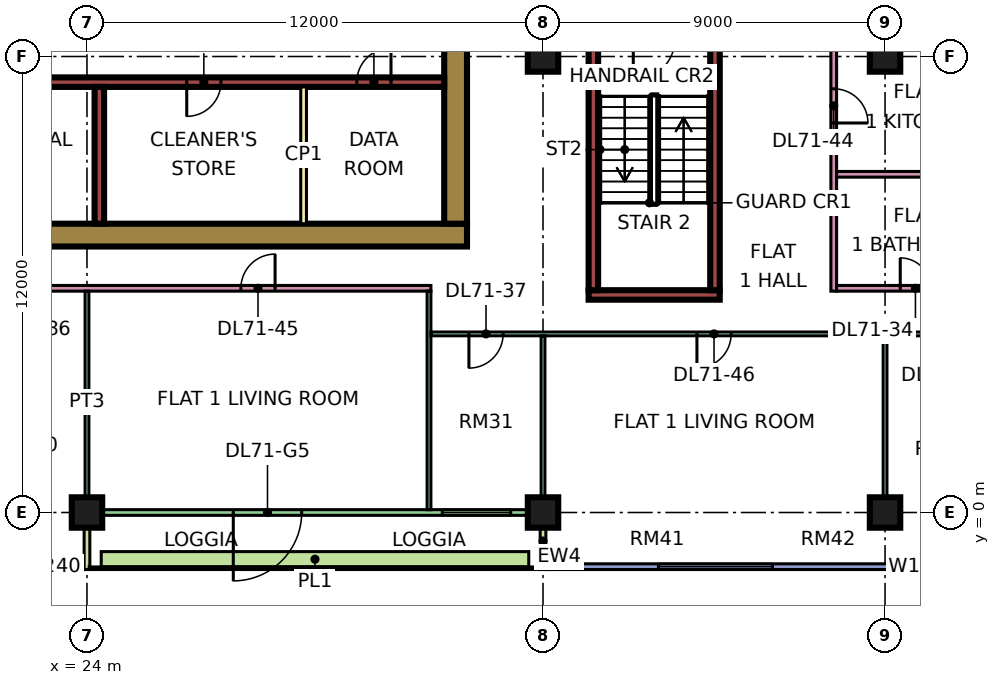
"""IFC4 building model, lengths in metres.
Left out: names, types, materials, properties, quantities, classifications, styles, units other than length and angle.
Written with IfcOpenShell. Run it as: python <this file> out.ifc"""

import sys

from ifc_helpers import new_model, si_unit, direction, frame, frame_2d, origin, origin_2d, place, context, subcontext, project, spatial, rectangle, extrude, element, fill, save


model = new_model("IFC4")
c1 = context("Model", 3, precision=1e-05, world=origin(), true_north=direction((0.0, 1.0)))
c2 = subcontext(c1, "Body", "Model", "MODEL_VIEW")
j1 = project(units=[si_unit("LENGTHUNIT", "METRE"), si_unit("PLANEANGLEUNIT", "RADIAN")], contexts=[c1])
p1 = place(None, origin())
s1 = spatial("IfcSite", under=j1, at=p1, CompositionType="ELEMENT")
p2 = place(p1, origin())
s2 = spatial("IfcBuilding", under=s1, at=p2, CompositionType="ELEMENT")
p3 = place(p2, frame((0.0, 0.0, 303.4)))
s3 = spatial("IfcBuildingStorey", under=s2, at=p3, CompositionType="ELEMENT", Elevation=303.4)
for number, where, z_axis, x_axis in (
    (1, (24.0, 0.0, 0.0), (0.0, 0.0, 1.0), (1.0, 0.0, 0.0)),
    (2, (36.0, 0.0, 0.0), (0.0, 0.0, 1.0), (1.0, 0.0, 0.0)),
    (3, (36.0, 12.0, 0.0), (0.0, 0.0, 1.0), (1.0, 0.0, 0.0)),
    (4, (45.0, 0.0, 0.0), (0.0, 0.0, 1.0), (1.0, 0.0, 0.0)),
    (5, (45.0, 12.0, 0.0), (0.0, 0.0, 1.0), (1.0, 0.0, 0.0)),
):
    element("IfcColumn", number, at=place(p3, frame(where, z_axis=z_axis, x_axis=x_axis)), inside=s3, PredefinedType="COLUMN", context=c2, shape_type="SweptSolid", body=[
        extrude(rectangle(XDim=0.8, YDim=0.8, at=origin_2d()), origin(), (0.0, 0.0, 1.0), 3.75),
    ])
p4 = place(p3, frame((9.0, 7.3, 0.0), z_axis=(0.0, 0.0, 1.0), x_axis=(1.0, 0.0, 0.0)))
e6 = element("IfcWall", 6, at=p4, inside=s3, PredefinedType="SHEAR", context=c2, shape_type="SweptSolid", body=[
    extrude(rectangle(XDim=25.0, YDim=0.6, at=frame_2d((12.5, 0.0))), origin(), (0.0, 0.0, 1.0), 3.75),
])
p5 = place(p3, frame((33.7, 7.6, 0.0), z_axis=(0.0, 0.0, 1.0), x_axis=(0.0, 1.0, 0.0)))
e7 = element("IfcWall", 7, at=p5, inside=s3, PredefinedType="SHEAR", context=c2, shape_type="SweptSolid", body=[
    extrude(rectangle(XDim=11.8, YDim=0.6, at=frame_2d((5.9, 0.0))), origin(), (0.0, 0.0, 1.0), 3.75),
])
p6 = place(p5, frame((5.6, 0.0, 0.0)))
e8 = element("IfcOpeningElement", 8, at=p6, cuts=e7, PredefinedType="OPENING", context=c2, shape_type="SweptSolid", body=[
    extrude(rectangle(XDim=1.8, YDim=2.4, at=frame_2d((0.9, 1.2))), frame((0.0, 0.31, 0.0), z_axis=(0.0, -1.0, 0.0), x_axis=(1.0, 0.0, 0.0)), (0.0, 0.0, 1.0), 0.62),
])
p7 = place(p3, frame((13.45, 11.325, 0.0), z_axis=(0.0, 0.0, 1.0), x_axis=(1.0, 0.0, 0.0)))
e9 = element("IfcWall", 9, at=p7, inside=s3, PredefinedType="SHEAR", context=c2, shape_type="SweptSolid", body=[
    extrude(rectangle(XDim=19.95, YDim=0.25, at=frame_2d((9.975, 0.0))), origin(), (0.0, 0.0, 1.0), 3.75),
])
p8 = place(p7, frame((2.8, 0.0, 0.0)))
e10 = element("IfcOpeningElement", 10, at=p8, cuts=e9, PredefinedType="OPENING", context=c2, shape_type="SweptSolid", body=[
    extrude(rectangle(XDim=0.9, YDim=2.1, at=frame_2d((0.45, 1.05))), frame((0.0, 0.135, 0.0), z_axis=(0.0, -1.0, 0.0), x_axis=(1.0, 0.0, 0.0)), (0.0, 0.0, 1.0), 0.27),
])
p9 = place(p7, frame((8.175, 0.0, 0.0)))
e11 = element("IfcOpeningElement", 11, at=p9, cuts=e9, PredefinedType="OPENING", context=c2, shape_type="SweptSolid", body=[
    extrude(rectangle(XDim=0.9, YDim=2.1, at=frame_2d((0.45, 1.05))), frame((0.0, 0.135, 0.0), z_axis=(0.0, -1.0, 0.0), x_axis=(1.0, 0.0, 0.0)), (0.0, 0.0, 1.0), 0.27),
])
p10 = place(p7, frame((13.175, 0.0, 0.0)))
e12 = element("IfcOpeningElement", 12, at=p10, cuts=e9, PredefinedType="OPENING", context=c2, shape_type="SweptSolid", body=[
    extrude(rectangle(XDim=0.9, YDim=2.1, at=frame_2d((0.45, 1.05))), frame((0.0, 0.135, 0.0), z_axis=(0.0, -1.0, 0.0), x_axis=(1.0, 0.0, 0.0)), (0.0, 0.0, 1.0), 0.27),
])
p11 = place(p7, frame((17.65, 0.0, 0.0)))
e13 = element("IfcOpeningElement", 13, at=p11, cuts=e9, PredefinedType="OPENING", context=c2, shape_type="SweptSolid", body=[
    extrude(rectangle(XDim=0.9, YDim=2.1, at=frame_2d((0.45, 1.05))), frame((0.0, 0.135, 0.0), z_axis=(0.0, -1.0, 0.0), x_axis=(1.0, 0.0, 0.0)), (0.0, 0.0, 1.0), 0.27),
])
p12 = place(p3, frame((24.325, 7.6, 0.0), z_axis=(0.0, 0.0, 1.0), x_axis=(0.0, 1.0, 0.0)))
e14 = element("IfcWall", 14, at=p12, inside=s3, PredefinedType="SHEAR", context=c2, shape_type="SweptSolid", body=[
    extrude(rectangle(XDim=3.6, YDim=0.25, at=frame_2d((1.8, 0.0))), origin(), (0.0, 0.0, 1.0), 3.75),
])
p13 = place(p3, frame((37.2, 5.725, 0.0), z_axis=(0.0, 0.0, 1.0), x_axis=(1.0, 0.0, 0.0)))
e15 = element("IfcWall", 15, at=p13, inside=s3, PredefinedType="SHEAR", context=c2, shape_type="SweptSolid", body=[
    extrude(rectangle(XDim=3.45, YDim=0.25, at=frame_2d((1.725, 0.0))), origin(), (0.0, 0.0, 1.0), 3.75),
])
for number, where, z_axis, x_axis in (
    (16, (37.325, 5.85, 0.0), (0.0, 0.0, 1.0), (0.0, 1.0, 0.0)),
    (17, (40.525, 5.85, 0.0), (0.0, 0.0, 1.0), (0.0, 1.0, 0.0)),
):
    element("IfcWall", number, at=place(p3, frame(where, z_axis=z_axis, x_axis=x_axis)), inside=s3, PredefinedType="SHEAR", context=c2, shape_type="SweptSolid", body=[
        extrude(rectangle(XDim=6.5, YDim=0.25, at=frame_2d((3.25, 0.0))), origin(), (0.0, 0.0, 1.0), 3.75),
    ])
p14 = place(p3, frame((12.5, -1.425, 0.0), z_axis=(0.0, 0.0, 1.0), x_axis=(1.0, 0.0, 0.0)))
e18 = element("IfcWall", 18, at=p14, inside=s3, PredefinedType="SOLIDWALL", context=c2, shape_type="SweptSolid", body=[
    extrude(rectangle(XDim=11.425, YDim=0.15, at=frame_2d((5.712, 0.0))), origin(), (0.0, 0.0, 1.0), 3.35),
])
p15 = place(p14, frame((1.25, 0.0, 0.45)))
e19 = element("IfcOpeningElement", 19, at=p15, cuts=e18, PredefinedType="OPENING", context=c2, shape_type="SweptSolid", body=[
    extrude(rectangle(XDim=3.0, YDim=2.4, at=frame_2d((1.5, 1.2))), frame((0.0, 0.085, 0.0), z_axis=(0.0, -1.0, 0.0), x_axis=(1.0, 0.0, 0.0)), (0.0, 0.0, 1.0), 0.17),
])
p16 = place(p14, frame((6.1, 0.0, 0.45)))
e20 = element("IfcOpeningElement", 20, at=p16, cuts=e18, PredefinedType="OPENING", context=c2, shape_type="SweptSolid", body=[
    extrude(rectangle(XDim=1.8, YDim=2.4, at=frame_2d((0.9, 1.2))), frame((0.0, 0.085, 0.0), z_axis=(0.0, -1.0, 0.0), x_axis=(1.0, 0.0, 0.0)), (0.0, 0.0, 1.0), 0.17),
])
p17 = place(p14, frame((9.062, 0.0, 0.45)))
e21 = element("IfcOpeningElement", 21, at=p17, cuts=e18, PredefinedType="OPENING", context=c2, shape_type="SweptSolid", body=[
    extrude(rectangle(XDim=1.8, YDim=2.4, at=frame_2d((0.9, 1.2))), frame((0.0, 0.085, 0.0), z_axis=(0.0, -1.0, 0.0), x_axis=(1.0, 0.0, 0.0)), (0.0, 0.0, 1.0), 0.17),
])
p18 = place(p3, frame((24.075, 0.0, 0.0), z_axis=(0.0, 0.0, 1.0), x_axis=(1.0, 0.0, 0.0)))
e22 = element("IfcWall", 22, at=p18, inside=s3, PredefinedType="SOLIDWALL", context=c2, shape_type="SweptSolid", body=[
    extrude(rectangle(XDim=11.85, YDim=0.15, at=frame_2d((5.925, 0.0))), origin(), (0.0, 0.0, 1.0), 3.35),
])
p19 = place(p18, frame((3.775, 0.0, 0.0)))
e23 = element("IfcOpeningElement", 23, at=p19, cuts=e22, PredefinedType="OPENING", context=c2, shape_type="SweptSolid", body=[
    extrude(rectangle(XDim=1.8, YDim=2.4, at=frame_2d((0.9, 1.2))), frame((0.0, 0.085, 0.0), z_axis=(0.0, -1.0, 0.0), x_axis=(1.0, 0.0, 0.0)), (0.0, 0.0, 1.0), 0.17),
])
p20 = place(p18, frame((9.275, 0.0, 0.45)))
e24 = element("IfcOpeningElement", 24, at=p20, cuts=e22, PredefinedType="OPENING", context=c2, shape_type="SweptSolid", body=[
    extrude(rectangle(XDim=1.8, YDim=2.4, at=frame_2d((0.9, 1.2))), frame((0.0, 0.085, 0.0), z_axis=(0.0, -1.0, 0.0), x_axis=(1.0, 0.0, 0.0)), (0.0, 0.0, 1.0), 0.17),
])
for number, where, z_axis, x_axis in (
    (25, (24.0, -1.5, 0.0), (0.0, 0.0, 1.0), (0.0, 1.0, 0.0)),
    (26, (36.0, -1.5, 0.0), (0.0, 0.0, 1.0), (0.0, 1.0, 0.0)),
):
    element("IfcWall", number, at=place(p3, frame(where, z_axis=z_axis, x_axis=x_axis)), inside=s3, PredefinedType="SOLIDWALL", context=c2, shape_type="SweptSolid", body=[
        extrude(rectangle(XDim=1.5, YDim=0.15, at=frame_2d((0.75, 0.0))), origin(), (0.0, 0.0, 1.0), 3.35),
    ])
p21 = place(p3, frame((36.075, -1.425, 0.0), z_axis=(0.0, 0.0, 1.0), x_axis=(1.0, 0.0, 0.0)))
e27 = element("IfcWall", 27, at=p21, inside=s3, PredefinedType="SOLIDWALL", context=c2, shape_type="SweptSolid", body=[
    extrude(rectangle(XDim=11.85, YDim=0.15, at=frame_2d((5.925, 0.0))), origin(), (0.0, 0.0, 1.0), 3.35),
])
p22 = place(p21, frame((2.962, 0.0, 0.45)))
e28 = element("IfcOpeningElement", 28, at=p22, cuts=e27, PredefinedType="OPENING", context=c2, shape_type="SweptSolid", body=[
    extrude(rectangle(XDim=3.0, YDim=2.4, at=frame_2d((1.5, 1.2))), frame((0.0, 0.085, 0.0), z_axis=(0.0, -1.0, 0.0), x_axis=(1.0, 0.0, 0.0)), (0.0, 0.0, 1.0), 0.17),
])
p23 = place(p21, frame((9.488, 0.0, 0.45)))
e29 = element("IfcOpeningElement", 29, at=p23, cuts=e27, PredefinedType="OPENING", context=c2, shape_type="SweptSolid", body=[
    extrude(rectangle(XDim=1.8, YDim=2.4, at=frame_2d((0.9, 1.2))), frame((0.0, 0.085, 0.0), z_axis=(0.0, -1.0, 0.0), x_axis=(1.0, 0.0, 0.0)), (0.0, 0.0, 1.0), 0.17),
])
p24 = place(p3, frame((24.375, -1.229, 0.0), z_axis=(0.0, 0.0, 1.0), x_axis=(1.0, 0.0, 0.0)))
e30 = element("IfcWall", 30, at=p24, inside=s3, PredefinedType="SOLIDWALL", context=c2, shape_type="SweptSolid", body=[
    extrude(rectangle(XDim=11.25, YDim=0.4, at=frame_2d((5.625, 0.0))), origin(), (0.0, 0.0, 1.0), 0.7),
])
p25 = place(p3, frame((29.7, 7.6, 0.0), z_axis=(0.0, 0.0, 1.0), x_axis=(0.0, 1.0, 0.0)))
e31 = element("IfcWall", 31, at=p25, inside=s3, PredefinedType="PARTITIONING", context=c2, shape_type="SweptSolid", body=[
    extrude(rectangle(XDim=3.6, YDim=0.15, at=frame_2d((1.8, 0.0))), origin(), (0.0, 0.0, 1.0), 3.35),
])
p26 = place(p3, frame((11.925, 5.9, 0.0), z_axis=(0.0, 0.0, 1.0), x_axis=(1.0, 0.0, 0.0)))
e32 = element("IfcWall", 32, at=p26, inside=s3, PredefinedType="PARTITIONING", context=c2, shape_type="SweptSolid", body=[
    extrude(rectangle(XDim=21.125, YDim=0.15, at=frame_2d((10.562, 0.0))), origin(), (0.0, 0.0, 1.0), 3.35),
])
p27 = place(p26, frame((7.125, 0.0, 0.0)))
e33 = element("IfcOpeningElement", 33, at=p27, cuts=e32, PredefinedType="OPENING", context=c2, shape_type="SweptSolid", body=[
    extrude(rectangle(XDim=0.9, YDim=2.1, at=frame_2d((0.45, 1.05))), frame((0.0, 0.085, 0.0), z_axis=(0.0, -1.0, 0.0), x_axis=(1.0, 0.0, 0.0)), (0.0, 0.0, 1.0), 0.17),
])
p28 = place(p26, frame((10.125, 0.0, 0.0)))
e34 = element("IfcOpeningElement", 34, at=p28, cuts=e32, PredefinedType="OPENING", context=c2, shape_type="SweptSolid", body=[
    extrude(rectangle(XDim=0.9, YDim=2.1, at=frame_2d((0.45, 1.05))), frame((0.0, 0.085, 0.0), z_axis=(0.0, -1.0, 0.0), x_axis=(1.0, 0.0, 0.0)), (0.0, 0.0, 1.0), 0.17),
])
p29 = place(p26, frame((4.125, 0.0, 0.0)))
e35 = element("IfcOpeningElement", 35, at=p29, cuts=e32, PredefinedType="OPENING", context=c2, shape_type="SweptSolid", body=[
    extrude(rectangle(XDim=0.9, YDim=2.1, at=frame_2d((0.45, 1.05))), frame((0.0, 0.085, 0.0), z_axis=(0.0, -1.0, 0.0), x_axis=(1.0, 0.0, 0.0)), (0.0, 0.0, 1.0), 0.17),
])
p30 = place(p26, frame((16.125, 0.0, 0.0)))
e36 = element("IfcOpeningElement", 36, at=p30, cuts=e32, PredefinedType="OPENING", context=c2, shape_type="SweptSolid", body=[
    extrude(rectangle(XDim=0.9, YDim=2.1, at=frame_2d((0.45, 1.05))), frame((0.0, 0.085, 0.0), z_axis=(0.0, -1.0, 0.0), x_axis=(1.0, 0.0, 0.0)), (0.0, 0.0, 1.0), 0.17),
])
p31 = place(p3, frame((24.0, 0.0, 0.0), z_axis=(0.0, 0.0, 1.0), x_axis=(0.0, 1.0, 0.0)))
e37 = element("IfcWall", 37, at=p31, inside=s3, PredefinedType="PARTITIONING", context=c2, shape_type="SweptSolid", body=[
    extrude(rectangle(XDim=5.825, YDim=0.1, at=frame_2d((2.913, 0.0))), origin(), (0.0, 0.0, 1.0), 3.35),
])
p32 = place(p3, frame((33.0, 0.074, 0.0), z_axis=(0.0, 0.0, 1.0), x_axis=(0.0, 1.0, 0.0)))
e38 = element("IfcWall", 38, at=p32, inside=s3, PredefinedType="PARTITIONING", context=c2, shape_type="SweptSolid", body=[
    extrude(rectangle(XDim=5.751, YDim=0.1, at=frame_2d((2.875, 0.0))), origin(), (0.0, 0.0, 1.0), 3.35),
])
p33 = place(p3, frame((33.05, 4.7, 0.0), z_axis=(0.0, 0.0, 1.0), x_axis=(1.0, 0.0, 0.0)))
e39 = element("IfcWall", 39, at=p33, inside=s3, PredefinedType="PARTITIONING", context=c2, shape_type="SweptSolid", body=[
    extrude(rectangle(XDim=14.85, YDim=0.1, at=frame_2d((7.425, 0.0))), origin(), (0.0, 0.0, 1.0), 3.35),
])
p34 = place(p33, frame((1.0, 0.0, 0.0)))
e40 = element("IfcOpeningElement", 40, at=p34, cuts=e39, PredefinedType="OPENING", context=c2, shape_type="SweptSolid", body=[
    extrude(rectangle(XDim=0.9, YDim=2.1, at=frame_2d((0.45, 1.05))), frame((0.0, 0.06, 0.0), z_axis=(0.0, -1.0, 0.0), x_axis=(1.0, 0.0, 0.0)), (0.0, 0.0, 1.0), 0.12),
])
p35 = place(p33, frame((13.0, 0.0, 0.0)))
e41 = element("IfcOpeningElement", 41, at=p35, cuts=e39, PredefinedType="OPENING", context=c2, shape_type="SweptSolid", body=[
    extrude(rectangle(XDim=0.9, YDim=2.1, at=frame_2d((0.45, 1.05))), frame((0.0, 0.06, 0.0), z_axis=(0.0, -1.0, 0.0), x_axis=(1.0, 0.0, 0.0)), (0.0, 0.0, 1.0), 0.12),
])
p36 = place(p33, frame((7.0, 0.0, 0.0)))
e42 = element("IfcOpeningElement", 42, at=p36, cuts=e39, PredefinedType="OPENING", context=c2, shape_type="SweptSolid", body=[
    extrude(rectangle(XDim=0.9, YDim=2.1, at=frame_2d((0.45, 1.05))), frame((0.0, 0.06, 0.0), z_axis=(0.0, -1.0, 0.0), x_axis=(1.0, 0.0, 0.0)), (0.0, 0.0, 1.0), 0.12),
])
p37 = place(p3, frame((36.0, 0.0, 0.0), z_axis=(0.0, 0.0, 1.0), x_axis=(0.0, 1.0, 0.0)))
e43 = element("IfcWall", 43, at=p37, inside=s3, PredefinedType="PARTITIONING", context=c2, shape_type="SweptSolid", body=[
    extrude(rectangle(XDim=4.65, YDim=0.1, at=frame_2d((2.325, 0.0))), origin(), (0.0, 0.0, 1.0), 3.35),
])
p38 = place(p3, frame((43.65, 5.825, 0.0), z_axis=(0.0, 0.0, 1.0), x_axis=(0.0, 1.0, 0.0)))
e44 = element("IfcWall", 44, at=p38, inside=s3, PredefinedType="PARTITIONING", context=c2, shape_type="SweptSolid", body=[
    extrude(rectangle(XDim=6.475, YDim=0.15, at=frame_2d((3.238, 0.0))), origin(), (0.0, 0.0, 1.0), 3.35),
])
p39 = place(p38, frame((4.425, 0.0, 0.0)))
e45 = element("IfcOpeningElement", 45, at=p39, cuts=e44, PredefinedType="OPENING", context=c2, shape_type="SweptSolid", body=[
    extrude(rectangle(XDim=0.9, YDim=2.1, at=frame_2d((0.45, 1.05))), frame((0.0, 0.085, 0.0), z_axis=(0.0, -1.0, 0.0), x_axis=(1.0, 0.0, 0.0)), (0.0, 0.0, 1.0), 0.17),
])
p40 = place(p3, frame((43.725, 5.9, 0.0), z_axis=(0.0, 0.0, 1.0), x_axis=(1.0, 0.0, 0.0)))
e46 = element("IfcWall", 46, at=p40, inside=s3, PredefinedType="PARTITIONING", context=c2, shape_type="SweptSolid", body=[
    extrude(rectangle(XDim=4.175, YDim=0.15, at=frame_2d((2.087, 0.0))), origin(), (0.0, 0.0, 1.0), 3.35),
])
p41 = place(p40, frame((1.675, 0.0, 0.0)))
e47 = element("IfcOpeningElement", 47, at=p41, cuts=e46, PredefinedType="OPENING", context=c2, shape_type="SweptSolid", body=[
    extrude(rectangle(XDim=0.8, YDim=2.1, at=frame_2d((0.4, 1.05))), frame((0.0, 0.085, 0.0), z_axis=(0.0, -1.0, 0.0), x_axis=(1.0, 0.0, 0.0)), (0.0, 0.0, 1.0), 0.17),
])
p42 = place(p3, frame((43.725, 8.9, 0.0), z_axis=(0.0, 0.0, 1.0), x_axis=(1.0, 0.0, 0.0)))
e48 = element("IfcWall", 48, at=p42, inside=s3, PredefinedType="PARTITIONING", context=c2, shape_type="SweptSolid", body=[
    extrude(rectangle(XDim=4.175, YDim=0.15, at=frame_2d((2.087, 0.0))), origin(), (0.0, 0.0, 1.0), 3.35),
])
p43 = place(p3, frame((45.0, 0.0, 0.0), z_axis=(0.0, 0.0, 1.0), x_axis=(0.0, 1.0, 0.0)))
e49 = element("IfcWall", 49, at=p43, inside=s3, PredefinedType="PARTITIONING", context=c2, shape_type="SweptSolid", body=[
    extrude(rectangle(XDim=4.65, YDim=0.1, at=frame_2d((2.325, 0.0))), origin(), (0.0, 0.0, 1.0), 3.35),
])
p44 = place(p17, origin())
e50 = element("IfcWindow", 50, at=p44, inside=s3, PartitioningType="SINGLE_PANEL", PredefinedType="WINDOW", context=c2, shape_type="SweptSolid", body=[
    extrude(rectangle(XDim=1.8, YDim=2.4, at=frame_2d((0.9, 1.2))), frame((0.0, 0.03, 0.0), z_axis=(0.0, -1.0, 0.0), x_axis=(1.0, 0.0, 0.0)), (0.0, 0.0, 1.0), 0.06),
])
fill(e21, e50)
p45 = place(p19, frame((1.8, 0.0, 0.0), z_axis=(0.0, 0.0, 1.0), x_axis=(-1.0, 0.0, 0.0)))
e51 = element("IfcDoor", 51, at=p45, inside=s3, OperationType="DOUBLE_DOOR_SINGLE_SWING", PredefinedType="DOOR", context=c2, shape_type="SweptSolid", body=[
    extrude(rectangle(XDim=1.8, YDim=2.4, at=frame_2d((0.9, 1.2))), frame((0.0, 0.025, 0.0), z_axis=(0.0, -1.0, 0.0), x_axis=(1.0, 0.0, 0.0)), (0.0, 0.0, 1.0), 0.05),
])
fill(e23, e51)
p46 = place(p20, origin())
e52 = element("IfcWindow", 52, at=p46, inside=s3, PartitioningType="SINGLE_PANEL", PredefinedType="WINDOW", context=c2, shape_type="SweptSolid", body=[
    extrude(rectangle(XDim=1.8, YDim=2.4, at=frame_2d((0.9, 1.2))), frame((0.0, 0.03, 0.0), z_axis=(0.0, -1.0, 0.0), x_axis=(1.0, 0.0, 0.0)), (0.0, 0.0, 1.0), 0.06),
])
fill(e24, e52)
p47 = place(p22, origin())
e53 = element("IfcWindow", 53, at=p47, inside=s3, PartitioningType="SINGLE_PANEL", PredefinedType="WINDOW", context=c2, shape_type="SweptSolid", body=[
    extrude(rectangle(XDim=3.0, YDim=2.4, at=frame_2d((1.5, 1.2))), frame((0.0, 0.03, 0.0), z_axis=(0.0, -1.0, 0.0), x_axis=(1.0, 0.0, 0.0)), (0.0, 0.0, 1.0), 0.06),
])
fill(e28, e53)
p48 = place(p23, origin())
e54 = element("IfcWindow", 54, at=p48, inside=s3, PartitioningType="SINGLE_PANEL", PredefinedType="WINDOW", context=c2, shape_type="SweptSolid", body=[
    extrude(rectangle(XDim=1.8, YDim=2.4, at=frame_2d((0.9, 1.2))), frame((0.0, 0.03, 0.0), z_axis=(0.0, -1.0, 0.0), x_axis=(1.0, 0.0, 0.0)), (0.0, 0.0, 1.0), 0.06),
])
fill(e29, e54)
p49 = place(p10, frame((0.9, 0.0, 0.0), z_axis=(0.0, 0.0, 1.0), x_axis=(-1.0, 0.0, 0.0)))
e55 = element("IfcDoor", 55, at=p49, inside=s3, OperationType="SINGLE_SWING_LEFT", PredefinedType="DOOR", context=c2, shape_type="SweptSolid", body=[
    extrude(rectangle(XDim=0.9, YDim=2.1, at=frame_2d((0.45, 1.05))), frame((0.0, 0.025, 0.0), z_axis=(0.0, -1.0, 0.0), x_axis=(1.0, 0.0, 0.0)), (0.0, 0.0, 1.0), 0.05),
])
fill(e12, e55)
p50 = place(p11, frame((0.9, 0.0, 0.0), z_axis=(0.0, 0.0, 1.0), x_axis=(-1.0, 0.0, 0.0)))
e56 = element("IfcDoor", 56, at=p50, inside=s3, OperationType="SINGLE_SWING_RIGHT", PredefinedType="DOOR", context=c2, shape_type="SweptSolid", body=[
    extrude(rectangle(XDim=0.9, YDim=2.1, at=frame_2d((0.45, 1.05))), frame((0.0, 0.025, 0.0), z_axis=(0.0, -1.0, 0.0), x_axis=(1.0, 0.0, 0.0)), (0.0, 0.0, 1.0), 0.05),
])
fill(e13, e56)
p51 = place(p41, origin())
e57 = element("IfcDoor", 57, at=p51, inside=s3, OperationType="SINGLE_SWING_LEFT", PredefinedType="DOOR", context=c2, shape_type="SweptSolid", body=[
    extrude(rectangle(XDim=0.8, YDim=2.1, at=frame_2d((0.4, 1.05))), frame((0.0, 0.025, 0.0), z_axis=(0.0, -1.0, 0.0), x_axis=(1.0, 0.0, 0.0)), (0.0, 0.0, 1.0), 0.05),
])
fill(e47, e57)
p52 = place(p34, frame((0.9, 0.0, 0.0), z_axis=(0.0, 0.0, 1.0), x_axis=(-1.0, 0.0, 0.0)))
e58 = element("IfcDoor", 58, at=p52, inside=s3, OperationType="SINGLE_SWING_LEFT", PredefinedType="DOOR", context=c2, shape_type="SweptSolid", body=[
    extrude(rectangle(XDim=0.9, YDim=2.1, at=frame_2d((0.45, 1.05))), frame((0.0, 0.025, 0.0), z_axis=(0.0, -1.0, 0.0), x_axis=(1.0, 0.0, 0.0)), (0.0, 0.0, 1.0), 0.05),
])
fill(e40, e58)
p53 = place(p39, frame((0.9, 0.0, 0.0), z_axis=(0.0, 0.0, 1.0), x_axis=(-1.0, 0.0, 0.0)))
e59 = element("IfcDoor", 59, at=p53, inside=s3, OperationType="SINGLE_SWING_LEFT", PredefinedType="DOOR", context=c2, shape_type="SweptSolid", body=[
    extrude(rectangle(XDim=0.9, YDim=2.1, at=frame_2d((0.45, 1.05))), frame((0.0, 0.025, 0.0), z_axis=(0.0, -1.0, 0.0), x_axis=(1.0, 0.0, 0.0)), (0.0, 0.0, 1.0), 0.05),
])
fill(e45, e59)
p54 = place(p30, frame((0.9, 0.0, 0.0), z_axis=(0.0, 0.0, 1.0), x_axis=(-1.0, 0.0, 0.0)))
e60 = element("IfcDoor", 60, at=p54, inside=s3, OperationType="SINGLE_SWING_RIGHT", PredefinedType="DOOR", context=c2, shape_type="SweptSolid", body=[
    extrude(rectangle(XDim=0.9, YDim=2.1, at=frame_2d((0.45, 1.05))), frame((0.0, 0.025, 0.0), z_axis=(0.0, -1.0, 0.0), x_axis=(1.0, 0.0, 0.0)), (0.0, 0.0, 1.0), 0.05),
])
fill(e36, e60)
p55 = place(p36, frame((0.9, 0.0, 0.0), z_axis=(0.0, 0.0, 1.0), x_axis=(-1.0, 0.0, 0.0)))
e61 = element("IfcDoor", 61, at=p55, inside=s3, OperationType="SINGLE_SWING_LEFT", PredefinedType="DOOR", context=c2, shape_type="SweptSolid", body=[
    extrude(rectangle(XDim=0.9, YDim=2.1, at=frame_2d((0.45, 1.05))), frame((0.0, 0.025, 0.0), z_axis=(0.0, -1.0, 0.0), x_axis=(1.0, 0.0, 0.0)), (0.0, 0.0, 1.0), 0.05),
])
fill(e42, e61)
save(model, sys.argv[1])
